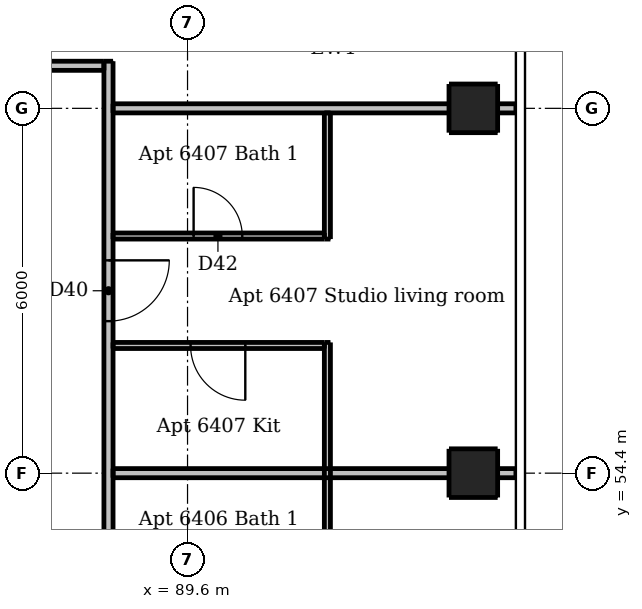
"""IFC4 building model, lengths in metres.
Left out: names, types, materials, properties, quantities, classifications, styles, units other than length and angle.
Written with IfcOpenShell. Run it as: python <this file> out.ifc"""

import sys

from ifc_helpers import new_model, si_unit, direction, frame, frame_2d, origin, origin_2d, place, context, subcontext, project, spatial, rectangle, extrude, element, fill, save


model = new_model("IFC4")
c1 = context("Model", 3, precision=1e-05, world=origin(), true_north=direction((0.0, 1.0)))
c2 = subcontext(c1, "Body", "Model", "MODEL_VIEW")
j1 = project(units=[si_unit("LENGTHUNIT", "METRE"), si_unit("PLANEANGLEUNIT", "RADIAN")], contexts=[c1])
p1 = place(None, origin())
s1 = spatial("IfcSite", under=j1, at=p1, CompositionType="ELEMENT")
p2 = place(p1, origin())
s2 = spatial("IfcBuilding", under=s1, at=p2, CompositionType="ELEMENT")
p3 = place(p2, frame((0.0, 0.0, 242.2)))
s3 = spatial("IfcBuildingStorey", under=s2, at=p3, CompositionType="ELEMENT", Elevation=242.2)
for number, where, z_axis, x_axis in (
    (1, (94.3, 54.4, 0.0), (0.0, 0.0, 1.0), (1.0, 0.0, 0.0)),
    (2, (94.3, 60.4, 0.0), (0.0, 0.0, 1.0), (1.0, 0.0, 0.0)),
):
    element("IfcColumn", number, at=place(p3, frame(where, z_axis=z_axis, x_axis=x_axis)), inside=s3, PredefinedType="COLUMN", context=c2, shape_type="SweptSolid", body=[
        extrude(rectangle(XDim=0.8, YDim=0.8, at=origin_2d()), origin(), (0.0, 0.0, 1.0), 3.05),
    ])
p4 = place(p3, frame((91.9, 52.25, 0.0), z_axis=(0.0, 0.0, 1.0), x_axis=(0.0, 1.0, 0.0)))
e3 = element("IfcWall", 3, at=p4, inside=s3, PredefinedType="PARTITIONING", context=c2, shape_type="SweptSolid", body=[
    extrude(rectangle(XDim=4.3, YDim=0.1, at=frame_2d((2.15, 0.0))), origin(), (0.0, 0.0, 1.0), 3.05),
])
p5 = place(p3, frame((91.9, 58.25, 0.0), z_axis=(0.0, 0.0, 1.0), x_axis=(0.0, 1.0, 0.0)))
e4 = element("IfcWall", 4, at=p5, inside=s3, PredefinedType="PARTITIONING", context=c2, shape_type="SweptSolid", body=[
    extrude(rectangle(XDim=2.075, YDim=0.1, at=frame_2d((1.038, 0.0))), origin(), (0.0, 0.0, 1.0), 3.05),
])
p6 = place(p3, frame((88.375, 58.3, 0.0), z_axis=(0.0, 0.0, 1.0), x_axis=(1.0, 0.0, 0.0)))
e5 = element("IfcWall", 5, at=p6, inside=s3, PredefinedType="PARTITIONING", context=c2, shape_type="SweptSolid", body=[
    extrude(rectangle(XDim=3.475, YDim=0.1, at=frame_2d((1.738, 0.0))), origin(), (0.0, 0.0, 1.0), 3.05),
])
p7 = place(p6, frame((1.325, 0.0, 0.0)))
e6 = element("IfcOpeningElement", 6, at=p7, cuts=e5, PredefinedType="OPENING", context=c2, shape_type="SweptSolid", body=[
    extrude(rectangle(XDim=0.8, YDim=2.1, at=frame_2d((0.4, 1.05))), frame((0.0, 0.06, 0.0), z_axis=(0.0, -1.0, 0.0), x_axis=(1.0, 0.0, 0.0)), (0.0, 0.0, 1.0), 0.12),
])
p8 = place(p3, frame((91.85, 56.5, 0.0), z_axis=(0.0, 0.0, 1.0), x_axis=(-1.0, 0.0, 0.0)))
e7 = element("IfcWall", 7, at=p8, inside=s3, PredefinedType="PARTITIONING", context=c2, shape_type="SweptSolid", body=[
    extrude(rectangle(XDim=3.475, YDim=0.1, at=frame_2d((1.738, 0.0))), origin(), (0.0, 0.0, 1.0), 3.05),
])
p9 = place(p8, frame((1.3, 0.0, 0.0)))
e8 = element("IfcOpeningElement", 8, at=p9, cuts=e7, PredefinedType="OPENING", context=c2, shape_type="SweptSolid", body=[
    extrude(rectangle(XDim=0.9, YDim=2.1, at=frame_2d((0.45, 1.05))), frame((0.0, 0.06, 0.0), z_axis=(0.0, -1.0, 0.0), x_axis=(1.0, 0.0, 0.0)), (0.0, 0.0, 1.0), 0.12),
])
p10 = place(p3, frame((88.3, 61.175, 0.0), z_axis=(0.0, 0.0, 1.0), x_axis=(0.0, -1.0, 0.0)))
e9 = element("IfcWall", 9, at=p10, inside=s3, PredefinedType="PARTITIONING", context=c2, shape_type="SweptSolid", body=[
    extrude(rectangle(XDim=29.4, YDim=0.15, at=frame_2d((14.7, 0.0))), origin(), (0.0, 0.0, 1.0), 3.05),
])
p11 = place(p10, frame((26.625, 0.0, 0.0)))
e10 = element("IfcOpeningElement", 10, at=p11, cuts=e9, PredefinedType="OPENING", context=c2, shape_type="SweptSolid", body=[
    extrude(rectangle(XDim=1.0, YDim=2.1, at=frame_2d((0.5, 1.05))), frame((0.0, 0.085, 0.0), z_axis=(0.0, -1.0, 0.0), x_axis=(1.0, 0.0, 0.0)), (0.0, 0.0, 1.0), 0.17),
])
p12 = place(p10, frame((15.275, 0.0, 0.0)))
e11 = element("IfcOpeningElement", 11, at=p12, cuts=e9, PredefinedType="OPENING", context=c2, shape_type="SweptSolid", body=[
    extrude(rectangle(XDim=1.0, YDim=2.1, at=frame_2d((0.5, 1.05))), frame((0.0, 0.085, 0.0), z_axis=(0.0, -1.0, 0.0), x_axis=(1.0, 0.0, 0.0)), (0.0, 0.0, 1.0), 0.17),
])
p13 = place(p10, frame((9.275, 0.0, 0.0)))
e12 = element("IfcOpeningElement", 12, at=p13, cuts=e9, PredefinedType="OPENING", context=c2, shape_type="SweptSolid", body=[
    extrude(rectangle(XDim=1.0, YDim=2.1, at=frame_2d((0.5, 1.05))), frame((0.0, 0.085, 0.0), z_axis=(0.0, -1.0, 0.0), x_axis=(1.0, 0.0, 0.0)), (0.0, 0.0, 1.0), 0.17),
])
p14 = place(p10, frame((3.275, 0.0, 0.0)))
e13 = element("IfcOpeningElement", 13, at=p14, cuts=e9, PredefinedType="OPENING", context=c2, shape_type="SweptSolid", body=[
    extrude(rectangle(XDim=1.0, YDim=2.1, at=frame_2d((0.5, 1.05))), frame((0.0, 0.085, 0.0), z_axis=(0.0, -1.0, 0.0), x_axis=(1.0, 0.0, 0.0)), (0.0, 0.0, 1.0), 0.17),
])
p15 = place(p3, frame((58.975, 61.1, 0.0), z_axis=(0.0, 0.0, 1.0), x_axis=(1.0, 0.0, 0.0)))
e14 = element("IfcWall", 14, at=p15, inside=s3, PredefinedType="PARTITIONING", context=c2, shape_type="SweptSolid", body=[
    extrude(rectangle(XDim=29.25, YDim=0.15, at=frame_2d((14.625, 0.0))), origin(), (0.0, 0.0, 1.0), 3.05),
])
p16 = place(p15, frame((3.125, 0.0, 0.0)))
e15 = element("IfcOpeningElement", 15, at=p16, cuts=e14, PredefinedType="OPENING", context=c2, shape_type="SweptSolid", body=[
    extrude(rectangle(XDim=1.0, YDim=2.1, at=frame_2d((0.5, 1.05))), frame((0.0, 0.085, 0.0), z_axis=(0.0, -1.0, 0.0), x_axis=(1.0, 0.0, 0.0)), (0.0, 0.0, 1.0), 0.17),
])
p17 = place(p15, frame((13.925, 0.0, 0.0)))
e16 = element("IfcOpeningElement", 16, at=p17, cuts=e14, PredefinedType="OPENING", context=c2, shape_type="SweptSolid", body=[
    extrude(rectangle(XDim=1.0, YDim=2.1, at=frame_2d((0.5, 1.05))), frame((0.0, 0.085, 0.0), z_axis=(0.0, -1.0, 0.0), x_axis=(1.0, 0.0, 0.0)), (0.0, 0.0, 1.0), 0.17),
])
p18 = place(p15, frame((26.475, 0.0, 0.0)))
e17 = element("IfcOpeningElement", 17, at=p18, cuts=e14, PredefinedType="OPENING", context=c2, shape_type="SweptSolid", body=[
    extrude(rectangle(XDim=1.0, YDim=2.1, at=frame_2d((0.5, 1.05))), frame((0.0, 0.085, 0.0), z_axis=(0.0, -1.0, 0.0), x_axis=(1.0, 0.0, 0.0)), (0.0, 0.0, 1.0), 0.17),
])
p19 = place(p3, frame((88.375, 60.4, 0.0), z_axis=(0.0, 0.0, 1.0), x_axis=(1.0, 0.0, 0.0)))
e18 = element("IfcWall", 18, at=p19, inside=s3, PredefinedType="PARTITIONING", context=c2, shape_type="SweptSolid", body=[
    extrude(rectangle(XDim=6.625, YDim=0.15, at=frame_2d((3.312, 0.0))), origin(), (0.0, 0.0, 1.0), 2.647),
])
p20 = place(p3, frame((88.375, 54.4, 0.0), z_axis=(0.0, 0.0, 1.0), x_axis=(1.0, 0.0, 0.0)))
e19 = element("IfcWall", 19, at=p20, inside=s3, PredefinedType="PARTITIONING", context=c2, shape_type="SweptSolid", body=[
    extrude(rectangle(XDim=6.625, YDim=0.15, at=frame_2d((3.312, 0.0))), origin(), (0.0, 0.0, 1.0), 2.59),
])
p21 = place(p14, origin())
e20 = element("IfcDoor", 20, at=p21, inside=s3, OperationType="SINGLE_SWING_LEFT", PredefinedType="DOOR", context=c2, shape_type="SweptSolid", body=[
    extrude(rectangle(XDim=1.0, YDim=2.1, at=frame_2d((0.5, 1.05))), frame((0.0, 0.025, 0.0), z_axis=(0.0, -1.0, 0.0), x_axis=(1.0, 0.0, 0.0)), (0.0, 0.0, 1.0), 0.05),
])
fill(e13, e20)
p22 = place(p9, origin())
e21 = element("IfcDoor", 21, at=p22, inside=s3, OperationType="SINGLE_SWING_LEFT", PredefinedType="DOOR", context=c2, shape_type="SweptSolid", body=[
    extrude(rectangle(XDim=0.9, YDim=2.1, at=frame_2d((0.45, 1.05))), frame((0.0, 0.025, 0.0), z_axis=(0.0, -1.0, 0.0), x_axis=(1.0, 0.0, 0.0)), (0.0, 0.0, 1.0), 0.05),
])
fill(e8, e21)
p23 = place(p7, origin())
e22 = element("IfcDoor", 22, at=p23, inside=s3, OperationType="SINGLE_SWING_LEFT", PredefinedType="DOOR", context=c2, shape_type="SweptSolid", body=[
    extrude(rectangle(XDim=0.8, YDim=2.1, at=frame_2d((0.4, 1.05))), frame((0.0, 0.025, 0.0), z_axis=(0.0, -1.0, 0.0), x_axis=(1.0, 0.0, 0.0)), (0.0, 0.0, 1.0), 0.05),
])
fill(e6, e22)
save(model, sys.argv[1])
